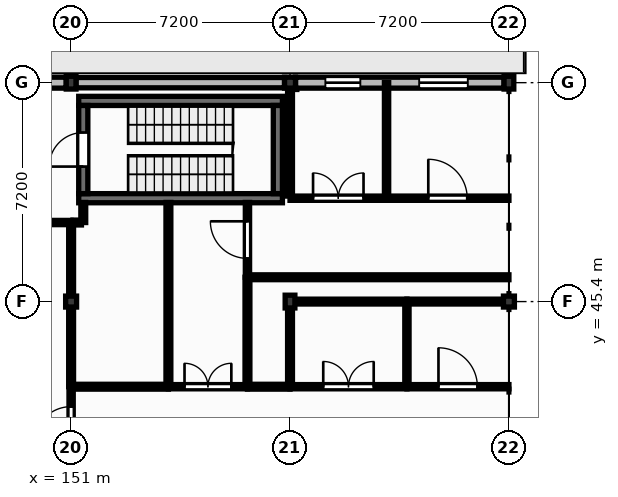
"""IFC4 building model, lengths in metres.
Left out: names, types, materials, properties, quantities, classifications, styles, units other than length and angle.
Written with IfcOpenShell. Run it as: python <this file> out.ifc"""

import sys

from ifc_helpers import new_model, si_unit, direction, frame, frame_2d, origin, origin_2d, place, context, subcontext, project, spatial, rectangle, extrude, element, fill, save


model = new_model("IFC4")
c1 = context("Model", 3, precision=1e-05, world=origin(), true_north=direction((0.0, 1.0)))
c2 = subcontext(c1, "Body", "Model", "MODEL_VIEW")
j1 = project(units=[si_unit("LENGTHUNIT", "METRE"), si_unit("PLANEANGLEUNIT", "RADIAN")], contexts=[c1])
p1 = place(None, origin())
s1 = spatial("IfcSite", under=j1, at=p1, CompositionType="ELEMENT")
p2 = place(p1, origin())
s2 = spatial("IfcBuilding", under=s1, at=p2, CompositionType="ELEMENT")
p3 = place(p2, frame((0.0, 0.0, 4.5)))
s3 = spatial("IfcBuildingStorey", under=s2, at=p3, CompositionType="ELEMENT", Elevation=4.5)
p4 = place(p3, frame((151.0, 45.4, 0.0), z_axis=(0.0, 0.0, 1.0), x_axis=(1.0, 0.0, 0.0)))
e1 = element("IfcColumn", 1, at=p4, inside=s3, PredefinedType="COLUMN", context=c2, shape_type="SweptSolid", body=[
    extrude(rectangle(XDim=0.36, YDim=0.36, at=origin_2d()), origin(), (0.0, 0.0, 1.0), 4.26),
])
for number, where, z_axis, x_axis in (
    (2, (151.0, 52.6, 0.0), (0.0, 0.0, 1.0), (1.0, 0.0, 0.0)),
    (3, (158.2, 45.4, 0.0), (0.0, 0.0, 1.0), (1.0, 0.0, 0.0)),
):
    element("IfcColumn", number, at=place(p3, frame(where, z_axis=z_axis, x_axis=x_axis)), inside=s3, PredefinedType="COLUMN", context=c2, shape_type="SweptSolid", body=[
        extrude(rectangle(XDim=0.32, YDim=0.42, at=origin_2d()), origin(), (0.0, 0.0, 1.0), 4.26),
    ])
for number, where, z_axis, x_axis in (
    (4, (158.2, 52.6, 0.0), (0.0, 0.0, 1.0), (1.0, 0.0, 0.0)),
    (5, (165.4, 45.4, 0.0), (0.0, 0.0, 1.0), (1.0, 0.0, 0.0)),
):
    element("IfcColumn", number, at=place(p3, frame(where, z_axis=z_axis, x_axis=x_axis)), inside=s3, PredefinedType="COLUMN", context=c2, shape_type="SweptSolid", body=[
        extrude(rectangle(XDim=0.36, YDim=0.36, at=origin_2d()), origin(), (0.0, 0.0, 1.0), 4.26),
    ])
p5 = place(p3, frame((165.4, 52.6, 0.0), z_axis=(0.0, 0.0, 1.0), x_axis=(1.0, 0.0, 0.0)))
e6 = element("IfcColumn", 6, at=p5, inside=s3, PredefinedType="COLUMN", context=c2, shape_type="SweptSolid", body=[
    extrude(rectangle(XDim=0.32, YDim=0.42, at=origin_2d()), origin(), (0.0, 0.0, 1.0), 4.26),
])
p6 = place(p3, frame((144.05, 52.6, 0.0), z_axis=(0.0, 0.0, 1.0), x_axis=(1.0, 0.0, 0.0)))
e7 = element("IfcWall", 7, at=p6, inside=s3, PredefinedType="SOLIDWALL", context=c2, shape_type="SweptSolid", body=[
    extrude(rectangle(XDim=6.79, YDim=0.36, at=frame_2d((3.395, 0.0))), origin(), (0.0, 0.0, 1.0), 3.76),
])
p7 = place(p6, frame((2.805, 0.0, 0.0)))
e8 = element("IfcOpeningElement", 8, at=p7, cuts=e7, PredefinedType="OPENING", context=c2, shape_type="SweptSolid", body=[
    extrude(rectangle(XDim=1.18, YDim=2.2, at=frame_2d((0.59, 1.1))), frame((0.0, 0.19, 0.0), z_axis=(0.0, -1.0, 0.0), x_axis=(1.0, 0.0, 0.0)), (0.0, 0.0, 1.0), 0.38),
])
p8 = place(p6, frame((0.708, 0.0, 1.35)))
e9 = element("IfcOpeningElement", 9, at=p8, cuts=e7, PredefinedType="OPENING", context=c2, shape_type="SweptSolid", body=[
    extrude(rectangle(XDim=1.45, YDim=1.4, at=frame_2d((0.725, 0.7))), frame((0.0, 0.19, 0.0), z_axis=(0.0, -1.0, 0.0), x_axis=(1.0, 0.0, 0.0)), (0.0, 0.0, 1.0), 0.38),
])
p9 = place(p6, frame((4.808, 0.0, 1.0)))
e10 = element("IfcOpeningElement", 10, at=p9, cuts=e7, PredefinedType="OPENING", context=c2, shape_type="SweptSolid", body=[
    extrude(rectangle(XDim=1.1, YDim=2.2, at=frame_2d((0.55, 1.1))), frame((0.0, 0.19, 0.0), z_axis=(0.0, -1.0, 0.0), x_axis=(1.0, 0.0, 0.0)), (0.0, 0.0, 1.0), 0.38),
])
p10 = place(p3, frame((151.16, 52.6, 0.0), z_axis=(0.0, 0.0, 1.0), x_axis=(1.0, 0.0, 0.0)))
e11 = element("IfcWall", 11, at=p10, inside=s3, PredefinedType="SOLIDWALL", context=c2, shape_type="SweptSolid", body=[
    extrude(rectangle(XDim=6.86, YDim=0.34, at=frame_2d((3.43, 0.0))), origin(), (0.0, 0.0, 1.0), 3.8),
])
p11 = place(p3, frame((158.38, 52.6, 0.0), z_axis=(0.0, 0.0, 1.0), x_axis=(1.0, 0.0, 0.0)))
e12 = element("IfcWall", 12, at=p11, inside=s3, PredefinedType="SOLIDWALL", context=c2, shape_type="SweptSolid", body=[
    extrude(rectangle(XDim=6.86, YDim=0.36, at=frame_2d((3.43, 0.0))), origin(), (0.0, 0.0, 1.0), 3.8),
])
p12 = place(p11, frame((0.983, 0.0, 1.5)))
e13 = element("IfcOpeningElement", 13, at=p12, cuts=e12, PredefinedType="OPENING", context=c2, shape_type="SweptSolid", body=[
    extrude(rectangle(XDim=1.15, YDim=1.25, at=frame_2d((0.575, 0.625))), frame((0.0, 0.19, 0.0), z_axis=(0.0, -1.0, 0.0), x_axis=(1.0, 0.0, 0.0)), (0.0, 0.0, 1.0), 0.38),
])
p13 = place(p11, frame((4.068, 0.0, 1.0)))
e14 = element("IfcOpeningElement", 14, at=p13, cuts=e12, PredefinedType="OPENING", context=c2, shape_type="SweptSolid", body=[
    extrude(rectangle(XDim=1.6, YDim=2.2, at=frame_2d((0.8, 1.1))), frame((0.0, 0.19, 0.0), z_axis=(0.0, -1.0, 0.0), x_axis=(1.0, 0.0, 0.0)), (0.0, 0.0, 1.0), 0.38),
])
for number, where, z_axis, x_axis in (
    (15, (151.25, 48.8, 0.0), (0.0, 0.0, 1.0), (1.0, 0.0, 0.0)),
    (16, (151.25, 52.0, 0.0), (0.0, 0.0, 1.0), (1.0, 0.0, 0.0)),
):
    element("IfcWall", number, at=place(p3, frame(where, z_axis=z_axis, x_axis=x_axis)), inside=s3, PredefinedType="SHEAR", context=c2, shape_type="SweptSolid", body=[
        extrude(rectangle(XDim=6.7, YDim=0.3, at=frame_2d((3.35, 0.0))), origin(), (0.0, 0.0, 1.0), 4.25),
    ])
p14 = place(p3, frame((151.4, 48.95, 0.0), z_axis=(0.0, 0.0, 1.0), x_axis=(0.0, 1.0, 0.0)))
e17 = element("IfcWall", 17, at=p14, inside=s3, PredefinedType="SHEAR", context=c2, shape_type="SweptSolid", body=[
    extrude(rectangle(XDim=2.9, YDim=0.3, at=frame_2d((1.45, 0.0))), origin(), (0.0, 0.0, 1.0), 4.25),
])
p15 = place(p14, frame((0.89, 0.0, 0.0)))
e18 = element("IfcOpeningElement", 18, at=p15, cuts=e17, PredefinedType="OPENING", context=c2, shape_type="SweptSolid", body=[
    extrude(rectangle(XDim=1.12, YDim=2.1, at=frame_2d((0.56, 1.05))), frame((0.0, 0.16, 0.0), z_axis=(0.0, -1.0, 0.0), x_axis=(1.0, 0.0, 0.0)), (0.0, 0.0, 1.0), 0.32),
])
p16 = place(p3, frame((157.8, 48.95, 0.0), z_axis=(0.0, 0.0, 1.0), x_axis=(0.0, 1.0, 0.0)))
e19 = element("IfcWall", 19, at=p16, inside=s3, PredefinedType="SHEAR", context=c2, shape_type="SweptSolid", body=[
    extrude(rectangle(XDim=2.9, YDim=0.3, at=frame_2d((1.45, 0.0))), origin(), (0.0, 0.0, 1.0), 4.25),
])
p17 = place(p3, frame((147.6, 48.0, 0.0), z_axis=(0.0, 0.0, 1.0), x_axis=(1.0, 0.0, 0.0)))
e20 = element("IfcWall", 20, at=p17, inside=s3, PredefinedType="PARTITIONING", context=c2, shape_type="SweptSolid", body=[
    extrude(rectangle(XDim=3.4, YDim=0.14, at=frame_2d((1.7, 0.0))), origin(), (0.0, 0.0, 1.0), 4.18),
])
p18 = place(p17, frame((0.8, 0.0, 0.0)))
e21 = element("IfcOpeningElement", 21, at=p18, cuts=e20, PredefinedType="OPENING", context=c2, shape_type="SweptSolid", body=[
    extrude(rectangle(XDim=1.8, YDim=2.3, at=frame_2d((0.9, 1.15))), frame((0.0, 0.08, 0.0), z_axis=(0.0, -1.0, 0.0), x_axis=(1.0, 0.0, 0.0)), (0.0, 0.0, 1.0), 0.16),
])
p19 = place(p3, frame((151.0, 40.07, 0.0), z_axis=(0.0, 0.0, 1.0), x_axis=(0.0, 1.0, 0.0)))
e22 = element("IfcWall", 22, at=p19, inside=s3, PredefinedType="PARTITIONING", context=c2, shape_type="SweptSolid", body=[
    extrude(rectangle(XDim=2.53, YDim=0.14, at=frame_2d((1.265, 0.0))), origin(), (0.0, 0.0, 1.0), 3.62),
])
p20 = place(p19, frame((0.655, 0.0, 0.0)))
e23 = element("IfcOpeningElement", 23, at=p20, cuts=e22, PredefinedType="OPENING", context=c2, shape_type="SweptSolid", body=[
    extrude(rectangle(XDim=1.22, YDim=2.1, at=frame_2d((0.61, 1.05))), frame((0.0, 0.08, 0.0), z_axis=(0.0, -1.0, 0.0), x_axis=(1.0, 0.0, 0.0)), (0.0, 0.0, 1.0), 0.16),
])
p21 = place(p3, frame((154.2, 42.6, 0.0), z_axis=(0.0, 0.0, 1.0), x_axis=(1.0, 0.0, 0.0)))
e24 = element("IfcWall", 24, at=p21, inside=s3, PredefinedType="PARTITIONING", context=c2, shape_type="SweptSolid", body=[
    extrude(rectangle(XDim=2.6, YDim=0.14, at=frame_2d((1.3, 0.0))), origin(), (0.0, 0.0, 1.0), 4.18),
])
p22 = place(p21, frame((0.53, 0.0, 0.0)))
e25 = element("IfcOpeningElement", 25, at=p22, cuts=e24, PredefinedType="OPENING", context=c2, shape_type="SweptSolid", body=[
    extrude(rectangle(XDim=1.54, YDim=2.25, at=frame_2d((0.77, 1.125))), frame((0.0, 0.08, 0.0), z_axis=(0.0, -1.0, 0.0), x_axis=(1.0, 0.0, 0.0)), (0.0, 0.0, 1.0), 0.16),
])
p23 = place(p3, frame((156.8, 46.2, 0.0), z_axis=(0.0, 0.0, 1.0), x_axis=(0.0, 1.0, 0.0)))
e26 = element("IfcWall", 26, at=p23, inside=s3, PredefinedType="PARTITIONING", context=c2, shape_type="SweptSolid", body=[
    extrude(rectangle(XDim=2.46, YDim=0.14, at=frame_2d((1.23, 0.0))), origin(), (0.0, 0.0, 1.0), 4.18),
])
p24 = place(p23, frame((0.62, 0.0, 0.0)))
e27 = element("IfcOpeningElement", 27, at=p24, cuts=e26, PredefinedType="OPENING", context=c2, shape_type="SweptSolid", body=[
    extrude(rectangle(XDim=1.22, YDim=2.1, at=frame_2d((0.61, 1.05))), frame((0.0, 0.08, 0.0), z_axis=(0.0, -1.0, 0.0), x_axis=(1.0, 0.0, 0.0)), (0.0, 0.0, 1.0), 0.16),
])
p25 = place(p3, frame((158.2, 42.6, 0.0), z_axis=(0.0, 0.0, 1.0), x_axis=(1.0, 0.0, 0.0)))
e28 = element("IfcWall", 28, at=p25, inside=s3, PredefinedType="PARTITIONING", context=c2, shape_type="SweptSolid", body=[
    extrude(rectangle(XDim=3.845, YDim=0.14, at=frame_2d((1.922, 0.0))), origin(), (0.0, 0.0, 1.0), 4.18),
])
p26 = place(p25, frame((1.093, 0.0, 0.0)))
e29 = element("IfcOpeningElement", 29, at=p26, cuts=e28, PredefinedType="OPENING", context=c2, shape_type="SweptSolid", body=[
    extrude(rectangle(XDim=1.66, YDim=2.3, at=frame_2d((0.83, 1.15))), frame((0.0, 0.08, 0.0), z_axis=(0.0, -1.0, 0.0), x_axis=(1.0, 0.0, 0.0)), (0.0, 0.0, 1.0), 0.16),
])
p27 = place(p3, frame((158.2, 48.8, 0.0), z_axis=(0.0, 0.0, 1.0), x_axis=(1.0, 0.0, 0.0)))
e30 = element("IfcWall", 30, at=p27, inside=s3, PredefinedType="PARTITIONING", context=c2, shape_type="SweptSolid", body=[
    extrude(rectangle(XDim=3.175, YDim=0.14, at=frame_2d((1.587, 0.0))), origin(), (0.0, 0.0, 1.0), 4.18),
])
p28 = place(p27, frame((0.758, 0.0, 0.0)))
e31 = element("IfcOpeningElement", 31, at=p28, cuts=e30, PredefinedType="OPENING", context=c2, shape_type="SweptSolid", body=[
    extrude(rectangle(XDim=1.66, YDim=2.3, at=frame_2d((0.83, 1.15))), frame((0.0, 0.08, 0.0), z_axis=(0.0, -1.0, 0.0), x_axis=(1.0, 0.0, 0.0)), (0.0, 0.0, 1.0), 0.16),
])
p29 = place(p3, frame((161.375, 48.87, 0.0), z_axis=(0.0, 0.0, 1.0), x_axis=(0.0, 1.0, 0.0)))
e32 = element("IfcWall", 32, at=p29, inside=s3, PredefinedType="PARTITIONING", context=c2, shape_type="SweptSolid", body=[
    extrude(rectangle(XDim=3.73, YDim=0.14, at=frame_2d((1.865, 0.0))), origin(), (0.0, 0.0, 1.0), 4.18),
])
p30 = place(p3, frame((161.375, 48.8, 0.0), z_axis=(0.0, 0.0, 1.0), x_axis=(1.0, 0.0, 0.0)))
e33 = element("IfcWall", 33, at=p30, inside=s3, PredefinedType="PARTITIONING", context=c2, shape_type="SweptSolid", body=[
    extrude(rectangle(XDim=4.025, YDim=0.14, at=frame_2d((2.012, 0.0))), origin(), (0.0, 0.0, 1.0), 4.18),
])
p31 = place(p30, frame((1.373, 0.0, 0.0)))
e34 = element("IfcOpeningElement", 34, at=p31, cuts=e33, PredefinedType="OPENING", context=c2, shape_type="SweptSolid", body=[
    extrude(rectangle(XDim=1.28, YDim=2.2, at=frame_2d((0.64, 1.1))), frame((0.0, 0.08, 0.0), z_axis=(0.0, -1.0, 0.0), x_axis=(1.0, 0.0, 0.0)), (0.0, 0.0, 1.0), 0.16),
])
p32 = place(p3, frame((162.045, 42.67, 0.0), z_axis=(0.0, 0.0, 1.0), x_axis=(0.0, 1.0, 0.0)))
e35 = element("IfcWall", 35, at=p32, inside=s3, PredefinedType="PARTITIONING", context=c2, shape_type="SweptSolid", body=[
    extrude(rectangle(XDim=2.73, YDim=0.14, at=frame_2d((1.365, 0.0))), origin(), (0.0, 0.0, 1.0), 4.18),
])
p33 = place(p3, frame((162.045, 42.6, 0.0), z_axis=(0.0, 0.0, 1.0), x_axis=(1.0, 0.0, 0.0)))
e36 = element("IfcWall", 36, at=p33, inside=s3, PredefinedType="PARTITIONING", context=c2, shape_type="SweptSolid", body=[
    extrude(rectangle(XDim=3.355, YDim=0.14, at=frame_2d((1.677, 0.0))), origin(), (0.0, 0.0, 1.0), 4.18),
])
p34 = place(p33, frame((1.038, 0.0, 0.0)))
e37 = element("IfcOpeningElement", 37, at=p34, cuts=e36, PredefinedType="OPENING", context=c2, shape_type="SweptSolid", body=[
    extrude(rectangle(XDim=1.28, YDim=2.2, at=frame_2d((0.64, 1.1))), frame((0.0, 0.08, 0.0), z_axis=(0.0, -1.0, 0.0), x_axis=(1.0, 0.0, 0.0)), (0.0, 0.0, 1.0), 0.16),
])
p35 = place(p3, frame((151.0, 42.6, 0.0), z_axis=(0.0, 0.0, 1.0), x_axis=(0.0, 1.0, 0.0)))
e38 = element("IfcWall", 38, at=p35, inside=s3, PredefinedType="PARTITIONING", context=c2, shape_type="SweptSolid", body=[
    extrude(rectangle(XDim=2.62, YDim=0.16, at=frame_2d((1.31, 0.0))), origin(), (0.0, 0.0, 1.0), 3.62),
])
p36 = place(p3, frame((151.0, 45.58, 0.0), z_axis=(0.0, 0.0, 1.0), x_axis=(0.0, 1.0, 0.0)))
e39 = element("IfcWall", 39, at=p36, inside=s3, PredefinedType="PARTITIONING", context=c2, shape_type="SweptSolid", body=[
    extrude(rectangle(XDim=2.35, YDim=0.16, at=frame_2d((1.175, 0.0))), origin(), (0.0, 0.0, 1.0), 3.74),
])
p37 = place(p3, frame((158.2, 42.6, 0.0), z_axis=(0.0, 0.0, 1.0), x_axis=(-1.0, 0.0, 0.0)))
e40 = element("IfcWall", 40, at=p37, inside=s3, PredefinedType="PARTITIONING", context=c2, shape_type="SweptSolid", body=[
    extrude(rectangle(XDim=1.4, YDim=0.16, at=frame_2d((0.7, 0.0))), origin(), (0.0, 0.0, 1.0), 4.18),
])
p38 = place(p3, frame((154.2, 42.6, 0.0), z_axis=(0.0, 0.0, 1.0), x_axis=(-1.0, 0.0, 0.0)))
e41 = element("IfcWall", 41, at=p38, inside=s3, PredefinedType="PARTITIONING", context=c2, shape_type="SweptSolid", body=[
    extrude(rectangle(XDim=3.2, YDim=0.16, at=frame_2d((1.6, 0.0))), origin(), (0.0, 0.0, 1.0), 4.18),
])
p39 = place(p3, frame((156.8, 42.67, 0.0), z_axis=(0.0, 0.0, 1.0), x_axis=(0.0, 1.0, 0.0)))
e42 = element("IfcWall", 42, at=p39, inside=s3, PredefinedType="PARTITIONING", context=c2, shape_type="SweptSolid", body=[
    extrude(rectangle(XDim=3.53, YDim=0.16, at=frame_2d((1.765, 0.0))), origin(), (0.0, 0.0, 1.0), 4.18),
])
p40 = place(p3, frame((154.2, 42.67, 0.0), z_axis=(0.0, 0.0, 1.0), x_axis=(0.0, 1.0, 0.0)))
e43 = element("IfcWall", 43, at=p40, inside=s3, PredefinedType="PARTITIONING", context=c2, shape_type="SweptSolid", body=[
    extrude(rectangle(XDim=5.99, YDim=0.16, at=frame_2d((2.995, 0.0))), origin(), (0.0, 0.0, 1.0), 4.18),
])
p41 = place(p3, frame((156.8, 46.2, 0.0), z_axis=(0.0, 0.0, 1.0), x_axis=(1.0, 0.0, 0.0)))
e44 = element("IfcWall", 44, at=p41, inside=s3, PredefinedType="PARTITIONING", context=c2, shape_type="SweptSolid", body=[
    extrude(rectangle(XDim=8.6, YDim=0.16, at=frame_2d((4.3, 0.0))), origin(), (0.0, 0.0, 1.0), 4.18),
])
p42 = place(p3, frame((151.06, 48.0, 0.0), z_axis=(0.0, 0.0, 1.0), x_axis=(1.0, 0.0, 0.0)))
e45 = element("IfcWall", 45, at=p42, inside=s3, PredefinedType="PARTITIONING", context=c2, shape_type="SweptSolid", body=[
    extrude(rectangle(XDim=0.28, YDim=0.16, at=frame_2d((0.14, 0.0))), origin(), (0.0, 0.0, 1.0), 4.18),
])
p43 = place(p3, frame((151.4, 48.0, 0.0), z_axis=(0.0, 0.0, 1.0), x_axis=(0.0, 1.0, 0.0)))
e46 = element("IfcWall", 46, at=p43, inside=s3, PredefinedType="PARTITIONING", context=c2, shape_type="SweptSolid", body=[
    extrude(rectangle(XDim=0.66, YDim=0.16, at=frame_2d((0.33, 0.0))), origin(), (0.0, 0.0, 1.0), 4.18),
])
p44 = place(p3, frame((162.045, 45.4, 0.0), z_axis=(0.0, 0.0, 1.0), x_axis=(-1.0, 0.0, 0.0)))
e47 = element("IfcWall", 47, at=p44, inside=s3, PredefinedType="PARTITIONING", context=c2, shape_type="SweptSolid", body=[
    extrude(rectangle(XDim=3.685, YDim=0.16, at=frame_2d((1.842, 0.0))), origin(), (0.0, 0.0, 1.0), 3.66),
])
p45 = place(p3, frame((158.2, 42.67, 0.0), z_axis=(0.0, 0.0, 1.0), x_axis=(0.0, 1.0, 0.0)))
e48 = element("IfcWall", 48, at=p45, inside=s3, PredefinedType="PARTITIONING", context=c2, shape_type="SweptSolid", body=[
    extrude(rectangle(XDim=2.52, YDim=0.16, at=frame_2d((1.26, 0.0))), origin(), (0.0, 0.0, 1.0), 3.62),
])
p46 = place(p3, frame((165.22, 45.4, 0.0), z_axis=(0.0, 0.0, 1.0), x_axis=(-1.0, 0.0, 0.0)))
e49 = element("IfcWall", 49, at=p46, inside=s3, PredefinedType="PARTITIONING", context=c2, shape_type="SweptSolid", body=[
    extrude(rectangle(XDim=3.175, YDim=0.16, at=frame_2d((1.587, 0.0))), origin(), (0.0, 0.0, 1.0), 3.66),
])
p47 = place(p3, frame((158.2, 48.87, 0.0), z_axis=(0.0, 0.0, 1.0), x_axis=(0.0, 1.0, 0.0)))
e50 = element("IfcWall", 50, at=p47, inside=s3, PredefinedType="PARTITIONING", context=c2, shape_type="SweptSolid", body=[
    extrude(rectangle(XDim=3.55, YDim=0.16, at=frame_2d((1.775, 0.0))), origin(), (0.0, 0.0, 1.0), 3.74),
])
p48 = place(p12, origin())
e51 = element("IfcWindow", 51, at=p48, inside=s3, PartitioningType="SINGLE_PANEL", PredefinedType="WINDOW", context=c2, shape_type="SweptSolid", body=[
    extrude(rectangle(XDim=1.15, YDim=1.25, at=frame_2d((0.575, 0.625))), frame((0.0, 0.03, 0.0), z_axis=(0.0, -1.0, 0.0), x_axis=(1.0, 0.0, 0.0)), (0.0, 0.0, 1.0), 0.06),
])
fill(e13, e51)
p49 = place(p13, origin())
e52 = element("IfcWindow", 52, at=p49, inside=s3, PartitioningType="DOUBLE_PANEL_VERTICAL", PredefinedType="WINDOW", context=c2, shape_type="SweptSolid", body=[
    extrude(rectangle(XDim=1.6, YDim=2.2, at=frame_2d((0.8, 1.1))), frame((0.0, 0.03, 0.0), z_axis=(0.0, -1.0, 0.0), x_axis=(1.0, 0.0, 0.0)), (0.0, 0.0, 1.0), 0.06),
])
fill(e14, e52)
p50 = place(p15, origin())
e53 = element("IfcDoor", 53, at=p50, inside=s3, OperationType="SINGLE_SWING_LEFT", PredefinedType="DOOR", context=c2, shape_type="SweptSolid", body=[
    extrude(rectangle(XDim=1.12, YDim=2.1, at=frame_2d((0.56, 1.05))), frame((0.0, 0.025, 0.0), z_axis=(0.0, -1.0, 0.0), x_axis=(1.0, 0.0, 0.0)), (0.0, 0.0, 1.0), 0.05),
])
fill(e18, e53)
p51 = place(p20, origin())
e54 = element("IfcDoor", 54, at=p51, inside=s3, OperationType="SINGLE_SWING_LEFT", PredefinedType="DOOR", context=c2, shape_type="SweptSolid", body=[
    extrude(rectangle(XDim=1.22, YDim=2.1, at=frame_2d((0.61, 1.05))), frame((0.0, 0.025, 0.0), z_axis=(0.0, -1.0, 0.0), x_axis=(1.0, 0.0, 0.0)), (0.0, 0.0, 1.0), 0.05),
])
fill(e23, e54)
p52 = place(p22, origin())
e55 = element("IfcDoor", 55, at=p52, inside=s3, OperationType="DOUBLE_DOOR_SINGLE_SWING", PredefinedType="DOOR", context=c2, shape_type="SweptSolid", body=[
    extrude(rectangle(XDim=1.54, YDim=2.25, at=frame_2d((0.77, 1.125))), frame((0.0, 0.025, 0.0), z_axis=(0.0, -1.0, 0.0), x_axis=(1.0, 0.0, 0.0)), (0.0, 0.0, 1.0), 0.05),
])
fill(e25, e55)
p53 = place(p24, origin())
e56 = element("IfcDoor", 56, at=p53, inside=s3, OperationType="SINGLE_SWING_RIGHT", PredefinedType="DOOR", context=c2, shape_type="SweptSolid", body=[
    extrude(rectangle(XDim=1.22, YDim=2.1, at=frame_2d((0.61, 1.05))), frame((0.0, 0.025, 0.0), z_axis=(0.0, -1.0, 0.0), x_axis=(1.0, 0.0, 0.0)), (0.0, 0.0, 1.0), 0.05),
])
fill(e27, e56)
p54 = place(p26, origin())
e57 = element("IfcDoor", 57, at=p54, inside=s3, OperationType="DOUBLE_DOOR_SINGLE_SWING", PredefinedType="DOOR", context=c2, shape_type="SweptSolid", body=[
    extrude(rectangle(XDim=1.66, YDim=2.3, at=frame_2d((0.83, 1.15))), frame((0.0, 0.025, 0.0), z_axis=(0.0, -1.0, 0.0), x_axis=(1.0, 0.0, 0.0)), (0.0, 0.0, 1.0), 0.05),
])
fill(e29, e57)
p55 = place(p34, origin())
e58 = element("IfcDoor", 58, at=p55, inside=s3, OperationType="SINGLE_SWING_LEFT", PredefinedType="DOOR", context=c2, shape_type="SweptSolid", body=[
    extrude(rectangle(XDim=1.28, YDim=2.2, at=frame_2d((0.64, 1.1))), frame((0.0, 0.025, 0.0), z_axis=(0.0, -1.0, 0.0), x_axis=(1.0, 0.0, 0.0)), (0.0, 0.0, 1.0), 0.05),
])
fill(e37, e58)
p56 = place(p28, origin())
e59 = element("IfcDoor", 59, at=p56, inside=s3, OperationType="DOUBLE_DOOR_SINGLE_SWING", PredefinedType="DOOR", context=c2, shape_type="SweptSolid", body=[
    extrude(rectangle(XDim=1.66, YDim=2.3, at=frame_2d((0.83, 1.15))), frame((0.0, 0.025, 0.0), z_axis=(0.0, -1.0, 0.0), x_axis=(1.0, 0.0, 0.0)), (0.0, 0.0, 1.0), 0.05),
])
fill(e31, e59)
p57 = place(p31, origin())
e60 = element("IfcDoor", 60, at=p57, inside=s3, OperationType="SINGLE_SWING_LEFT", PredefinedType="DOOR", context=c2, shape_type="SweptSolid", body=[
    extrude(rectangle(XDim=1.28, YDim=2.2, at=frame_2d((0.64, 1.1))), frame((0.0, 0.025, 0.0), z_axis=(0.0, -1.0, 0.0), x_axis=(1.0, 0.0, 0.0)), (0.0, 0.0, 1.0), 0.05),
])
fill(e34, e60)
save(model, sys.argv[1])
